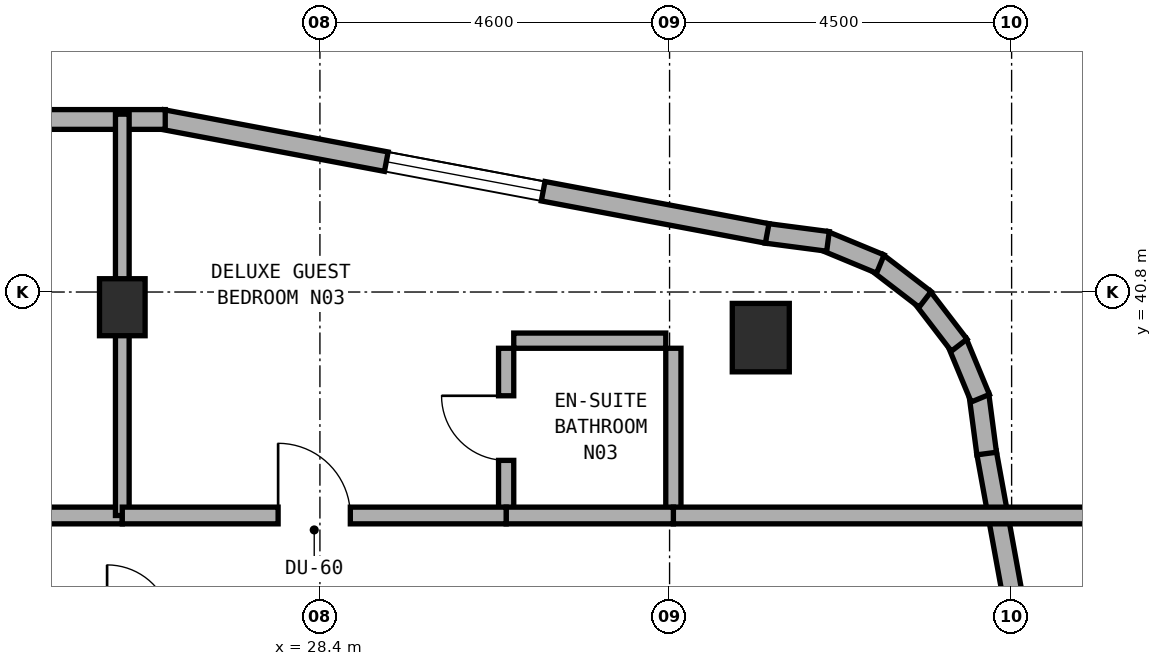
"""IFC4 building model, lengths in metres.
Left out: names, types, materials, properties, quantities, classifications, styles, units other than length and angle.
Written with IfcOpenShell. Run it as: python <this file> out.ifc"""

import sys

from ifc_helpers import new_model, si_unit, direction, frame, frame_2d, origin, origin_2d, place, context, subcontext, project, spatial, rectangle, extrude, element, fill, save


model = new_model("IFC4")
c1 = context("Model", 3, precision=1e-05, world=origin(), true_north=direction((0.0, 1.0)))
c2 = subcontext(c1, "Body", "Model", "MODEL_VIEW")
j1 = project(units=[si_unit("LENGTHUNIT", "METRE"), si_unit("PLANEANGLEUNIT", "RADIAN")], contexts=[c1])
p1 = place(None, origin())
s1 = spatial("IfcSite", under=j1, at=p1, CompositionType="ELEMENT")
p2 = place(p1, origin())
s2 = spatial("IfcBuilding", under=s1, at=p2, CompositionType="ELEMENT")
p3 = place(p2, frame((0.0, 0.0, 254.0)))
s3 = spatial("IfcBuildingStorey", under=s2, at=p3, CompositionType="ELEMENT", Elevation=254.0)
p4 = place(p3, frame((25.8, 40.6, 0.0), z_axis=(0.0, 0.0, 1.0), x_axis=(1.0, 0.0, 0.0)))
e1 = element("IfcColumn", 1, at=p4, inside=s3, PredefinedType="COLUMN", context=c2, shape_type="SweptSolid", body=[
    extrude(rectangle(XDim=0.6, YDim=0.75, at=origin_2d()), origin(), (0.0, 0.0, 1.0), 3.6),
])
p5 = place(p3, frame((34.2, 40.2, 0.0), z_axis=(0.0, 0.0, 1.0), x_axis=(1.0, 0.0, 0.0)))
e2 = element("IfcColumn", 2, at=p5, inside=s3, PredefinedType="COLUMN", context=c2, shape_type="SweptSolid", body=[
    extrude(rectangle(XDim=0.75, YDim=0.9, at=origin_2d()), origin(), (0.0, 0.0, 1.0), 3.6),
])
p6 = place(p3, frame((38.682, 30.383, 0.0), z_axis=(0.0, 0.0, 1.0), x_axis=(-0.179061111398, 0.983837953316, 0.0)))
e3 = element("IfcWall", 3, at=p6, inside=s3, PredefinedType="STANDARD", context=c2, shape_type="SweptSolid", body=[
    extrude(rectangle(XDim=8.438, YDim=0.26, at=frame_2d((4.219, 0.0))), origin(), (0.0, 0.0, 1.0), 3.32),
])
p7 = place(p6, frame((2.03, 0.0, 0.85)))
e4 = element("IfcOpeningElement", 4, at=p7, cuts=e3, PredefinedType="OPENING", context=c2, shape_type="SweptSolid", body=[
    extrude(rectangle(XDim=2.1, YDim=1.5, at=frame_2d((1.05, 0.75))), frame((0.0, 0.14, 0.0), z_axis=(0.0, -1.0, 0.0), x_axis=(1.0, 0.0, 0.0)), (0.0, 0.0, 1.0), 0.28),
])
p8 = place(p3, frame((37.172, 38.675, 0.0), z_axis=(0.0, 0.0, 1.0), x_axis=(-0.130729574419, 0.991418064377, 0.0)))
e5 = element("IfcWall", 5, at=p8, inside=s3, PredefinedType="STANDARD", context=c2, shape_type="SweptSolid", body=[
    extrude(rectangle(XDim=0.781, YDim=0.26, at=frame_2d((0.39, 0.0))), origin(), (0.0, 0.0, 1.0), 3.32),
])
p9 = place(p3, frame((37.088, 39.403, 0.0), z_axis=(0.0, 0.0, 1.0), x_axis=(-0.382900540965, 0.923789573295, 0.0)))
e6 = element("IfcWall", 6, at=p9, inside=s3, PredefinedType="STANDARD", context=c2, shape_type="SweptSolid", body=[
    extrude(rectangle(XDim=0.799, YDim=0.26, at=frame_2d((0.399, 0.0))), origin(), (0.0, 0.0, 1.0), 3.32),
])
p10 = place(p3, frame((36.81, 40.101, 0.0), z_axis=(0.0, 0.0, 1.0), x_axis=(-0.60916352983, 0.793044635519, 0.0)))
e7 = element("IfcWall", 7, at=p10, inside=s3, PredefinedType="STANDARD", context=c2, shape_type="SweptSolid", body=[
    extrude(rectangle(XDim=0.798, YDim=0.26, at=frame_2d((0.399, 0.0))), origin(), (0.0, 0.0, 1.0), 3.32),
])
p11 = place(p3, frame((36.362, 40.703, 0.0), z_axis=(0.0, 0.0, 1.0), x_axis=(-0.793158129381, 0.609015748398, 0.0)))
e8 = element("IfcWall", 8, at=p11, inside=s3, PredefinedType="STANDARD", context=c2, shape_type="SweptSolid", body=[
    extrude(rectangle(XDim=0.798, YDim=0.26, at=frame_2d((0.399, 0.0))), origin(), (0.0, 0.0, 1.0), 3.32),
])
p12 = place(p3, frame((35.773, 41.168, 0.0), z_axis=(0.0, 0.0, 1.0), x_axis=(-0.923681457047, 0.383161279238, 0.0)))
e9 = element("IfcWall", 9, at=p12, inside=s3, PredefinedType="STANDARD", context=c2, shape_type="SweptSolid", body=[
    extrude(rectangle(XDim=0.799, YDim=0.26, at=frame_2d((0.399, 0.0))), origin(), (0.0, 0.0, 1.0), 3.32),
])
p13 = place(p3, frame((35.084, 41.466, 0.0), z_axis=(0.0, 0.0, 1.0), x_axis=(-0.99153354416, 0.129850802102, 0.0)))
e10 = element("IfcWall", 10, at=p13, inside=s3, PredefinedType="STANDARD", context=c2, shape_type="SweptSolid", body=[
    extrude(rectangle(XDim=0.816, YDim=0.26, at=frame_2d((0.408, 0.0))), origin(), (0.0, 0.0, 1.0), 3.32),
])
p14 = place(p3, frame((34.284, 41.571, 0.0), z_axis=(0.0, 0.0, 1.0), x_axis=(-0.982717573718, 0.185111237656, 0.0)))
e11 = element("IfcWall", 11, at=p14, inside=s3, PredefinedType="STANDARD", context=c2, shape_type="SweptSolid", body=[
    extrude(rectangle(XDim=8.098, YDim=0.26, at=frame_2d((4.049, 0.0))), origin(), (0.0, 0.0, 1.0), 3.32),
])
p15 = place(p14, frame((2.999, 0.0, 0.85)))
e12 = element("IfcOpeningElement", 12, at=p15, cuts=e11, PredefinedType="OPENING", context=c2, shape_type="SweptSolid", body=[
    extrude(rectangle(XDim=2.1, YDim=1.5, at=frame_2d((1.05, 0.75))), frame((0.0, 0.14, 0.0), z_axis=(0.0, -1.0, 0.0), x_axis=(1.0, 0.0, 0.0)), (0.0, 0.0, 1.0), 0.28),
])
p16 = place(p3, frame((26.365, 43.07, 0.0), z_axis=(0.0, 0.0, 1.0), x_axis=(-1.0, 0.0, 0.0)))
e13 = element("IfcWall", 13, at=p16, inside=s3, PredefinedType="STANDARD", context=c2, shape_type="SweptSolid", body=[
    extrude(rectangle(XDim=10.695, YDim=0.26, at=frame_2d((5.348, 0.0))), origin(), (0.0, 0.0, 1.0), 3.32),
])
p17 = place(p16, frame((4.765, 0.0, 0.0)))
e14 = element("IfcOpeningElement", 14, at=p17, cuts=e13, PredefinedType="OPENING", context=c2, shape_type="SweptSolid", body=[
    extrude(rectangle(XDim=1.2, YDim=2.15, at=frame_2d((0.6, 1.075))), frame((0.0, 0.14, 0.0), z_axis=(0.0, -1.0, 0.0), x_axis=(1.0, 0.0, 0.0)), (0.0, 0.0, 1.0), 0.28),
])
p18 = place(p16, frame((1.54, 0.0, 0.85)))
e15 = element("IfcOpeningElement", 15, at=p18, cuts=e13, PredefinedType="OPENING", context=c2, shape_type="SweptSolid", body=[
    extrude(rectangle(XDim=2.1, YDim=1.5, at=frame_2d((1.05, 0.75))), frame((0.0, 0.14, 0.0), z_axis=(0.0, -1.0, 0.0), x_axis=(1.0, 0.0, 0.0)), (0.0, 0.0, 1.0), 0.28),
])
p19 = place(p16, frame((7.09, 0.0, 0.85)))
e16 = element("IfcOpeningElement", 16, at=p19, cuts=e13, PredefinedType="OPENING", context=c2, shape_type="SweptSolid", body=[
    extrude(rectangle(XDim=2.1, YDim=1.5, at=frame_2d((1.05, 0.75))), frame((0.0, 0.14, 0.0), z_axis=(0.0, -1.0, 0.0), x_axis=(1.0, 0.0, 0.0)), (0.0, 0.0, 1.0), 0.28),
])
p20 = place(p3, frame((18.4, 37.86, 0.0), z_axis=(0.0, 0.0, 1.0), x_axis=(1.0, 0.0, 0.0)))
e17 = element("IfcWall", 17, at=p20, inside=s3, PredefinedType="SOLIDWALL", context=c2, shape_type="SweptSolid", body=[
    extrude(rectangle(XDim=7.4, YDim=0.22, at=frame_2d((3.7, 0.0))), origin(), (0.0, 0.0, 1.0), 2.745),
])
p21 = place(p20, frame((3.225, 0.0, 0.0)))
e18 = element("IfcOpeningElement", 18, at=p21, cuts=e17, PredefinedType="OPENING", context=c2, shape_type="SweptSolid", body=[
    extrude(rectangle(XDim=0.95, YDim=2.1, at=frame_2d((0.475, 1.05))), frame((0.0, 0.12, 0.0), z_axis=(0.0, -1.0, 0.0), x_axis=(1.0, 0.0, 0.0)), (0.0, 0.0, 1.0), 0.24),
])
p22 = place(p3, frame((25.8, 37.86, 0.0), z_axis=(0.0, 0.0, 1.0), x_axis=(0.0, 1.0, 0.0)))
e19 = element("IfcWall", 19, at=p22, inside=s3, PredefinedType="SOLIDWALL", context=c2, shape_type="SweptSolid", body=[
    extrude(rectangle(XDim=5.28, YDim=0.18, at=frame_2d((2.64, 0.0))), origin(), (0.0, 0.0, 1.0), 2.745),
])
p23 = place(p3, frame((30.85, 37.96, 0.0), z_axis=(0.0, 0.0, 1.0), x_axis=(0.0, 1.0, 0.0)))
e20 = element("IfcWall", 20, at=p23, inside=s3, PredefinedType="PLUMBINGWALL", context=c2, shape_type="SweptSolid", body=[
    extrude(rectangle(XDim=2.1, YDim=0.2, at=frame_2d((1.05, 0.0))), origin(), (0.0, 0.0, 1.0), 2.845),
])
p24 = place(p23, frame((0.625, 0.0, 0.0)))
e21 = element("IfcOpeningElement", 21, at=p24, cuts=e20, PredefinedType="OPENING", context=c2, shape_type="SweptSolid", body=[
    extrude(rectangle(XDim=0.85, YDim=2.1, at=frame_2d((0.425, 1.05))), frame((0.0, 0.11, 0.0), z_axis=(0.0, -1.0, 0.0), x_axis=(1.0, 0.0, 0.0)), (0.0, 0.0, 1.0), 0.22),
])
p25 = place(p3, frame((30.95, 40.16, 0.0), z_axis=(0.0, 0.0, 1.0), x_axis=(1.0, 0.0, 0.0)))
e22 = element("IfcWall", 22, at=p25, inside=s3, PredefinedType="PLUMBINGWALL", context=c2, shape_type="SweptSolid", body=[
    extrude(rectangle(XDim=2.0, YDim=0.2, at=frame_2d((1.0, 0.0))), origin(), (0.0, 0.0, 1.0), 3.015),
])
p26 = place(p3, frame((33.05, 37.96, 0.0), z_axis=(0.0, 0.0, 1.0), x_axis=(0.0, 1.0, 0.0)))
e23 = element("IfcWall", 23, at=p26, inside=s3, PredefinedType="PLUMBINGWALL", context=c2, shape_type="SweptSolid", body=[
    extrude(rectangle(XDim=2.1, YDim=0.2, at=frame_2d((1.05, 0.0))), origin(), (0.0, 0.0, 1.0), 2.845),
])
p27 = place(p3, frame((33.05, 37.86, 0.0), z_axis=(0.0, 0.0, 1.0), x_axis=(1.0, 0.0, 0.0)))
e24 = element("IfcWall", 24, at=p27, inside=s3, PredefinedType="SOLIDWALL", context=c2, shape_type="SweptSolid", body=[
    extrude(rectangle(XDim=5.59, YDim=0.22, at=frame_2d((2.795, 0.0))), origin(), (0.0, 0.0, 1.0), 2.745),
])
p28 = place(p3, frame((30.85, 37.86, 0.0), z_axis=(0.0, 0.0, 1.0), x_axis=(1.0, 0.0, 0.0)))
e25 = element("IfcWall", 25, at=p28, inside=s3, PredefinedType="SOLIDWALL", context=c2, shape_type="SweptSolid", body=[
    extrude(rectangle(XDim=2.2, YDim=0.22, at=frame_2d((1.1, 0.0))), origin(), (0.0, 0.0, 1.0), 3.32),
])
p29 = place(p3, frame((25.8, 37.86, 0.0), z_axis=(0.0, 0.0, 1.0), x_axis=(1.0, 0.0, 0.0)))
e26 = element("IfcWall", 26, at=p29, inside=s3, PredefinedType="SOLIDWALL", context=c2, shape_type="SweptSolid", body=[
    extrude(rectangle(XDim=5.05, YDim=0.22, at=frame_2d((2.525, 0.0))), origin(), (0.0, 0.0, 1.0), 2.745),
])
p30 = place(p29, frame((2.05, 0.0, 0.0)))
e27 = element("IfcOpeningElement", 27, at=p30, cuts=e26, PredefinedType="OPENING", context=c2, shape_type="SweptSolid", body=[
    extrude(rectangle(XDim=0.95, YDim=2.1, at=frame_2d((0.475, 1.05))), frame((0.0, 0.12, 0.0), z_axis=(0.0, -1.0, 0.0), x_axis=(1.0, 0.0, 0.0)), (0.0, 0.0, 1.0), 0.24),
])
p31 = place(p15, origin())
e28 = element("IfcWindow", 28, at=p31, inside=s3, PartitioningType="SINGLE_PANEL", PredefinedType="WINDOW", context=c2, shape_type="SweptSolid", body=[
    extrude(rectangle(XDim=2.1, YDim=1.5, at=frame_2d((1.05, 0.75))), frame((0.0, 0.03, 0.0), z_axis=(0.0, -1.0, 0.0), x_axis=(1.0, 0.0, 0.0)), (0.0, 0.0, 1.0), 0.06),
])
fill(e12, e28)
p32 = place(p24, origin())
e29 = element("IfcDoor", 29, at=p32, inside=s3, OperationType="SINGLE_SWING_RIGHT", PredefinedType="DOOR", context=c2, shape_type="SweptSolid", body=[
    extrude(rectangle(XDim=0.85, YDim=2.1, at=frame_2d((0.425, 1.05))), frame((0.0, 0.025, 0.0), z_axis=(0.0, -1.0, 0.0), x_axis=(1.0, 0.0, 0.0)), (0.0, 0.0, 1.0), 0.05),
])
fill(e21, e29)
p33 = place(p30, origin())
e30 = element("IfcDoor", 30, at=p33, inside=s3, OperationType="SINGLE_SWING_LEFT", PredefinedType="DOOR", context=c2, shape_type="SweptSolid", body=[
    extrude(rectangle(XDim=0.95, YDim=2.1, at=frame_2d((0.475, 1.05))), frame((0.0, 0.025, 0.0), z_axis=(0.0, -1.0, 0.0), x_axis=(1.0, 0.0, 0.0)), (0.0, 0.0, 1.0), 0.05),
])
fill(e27, e30)
save(model, sys.argv[1])
